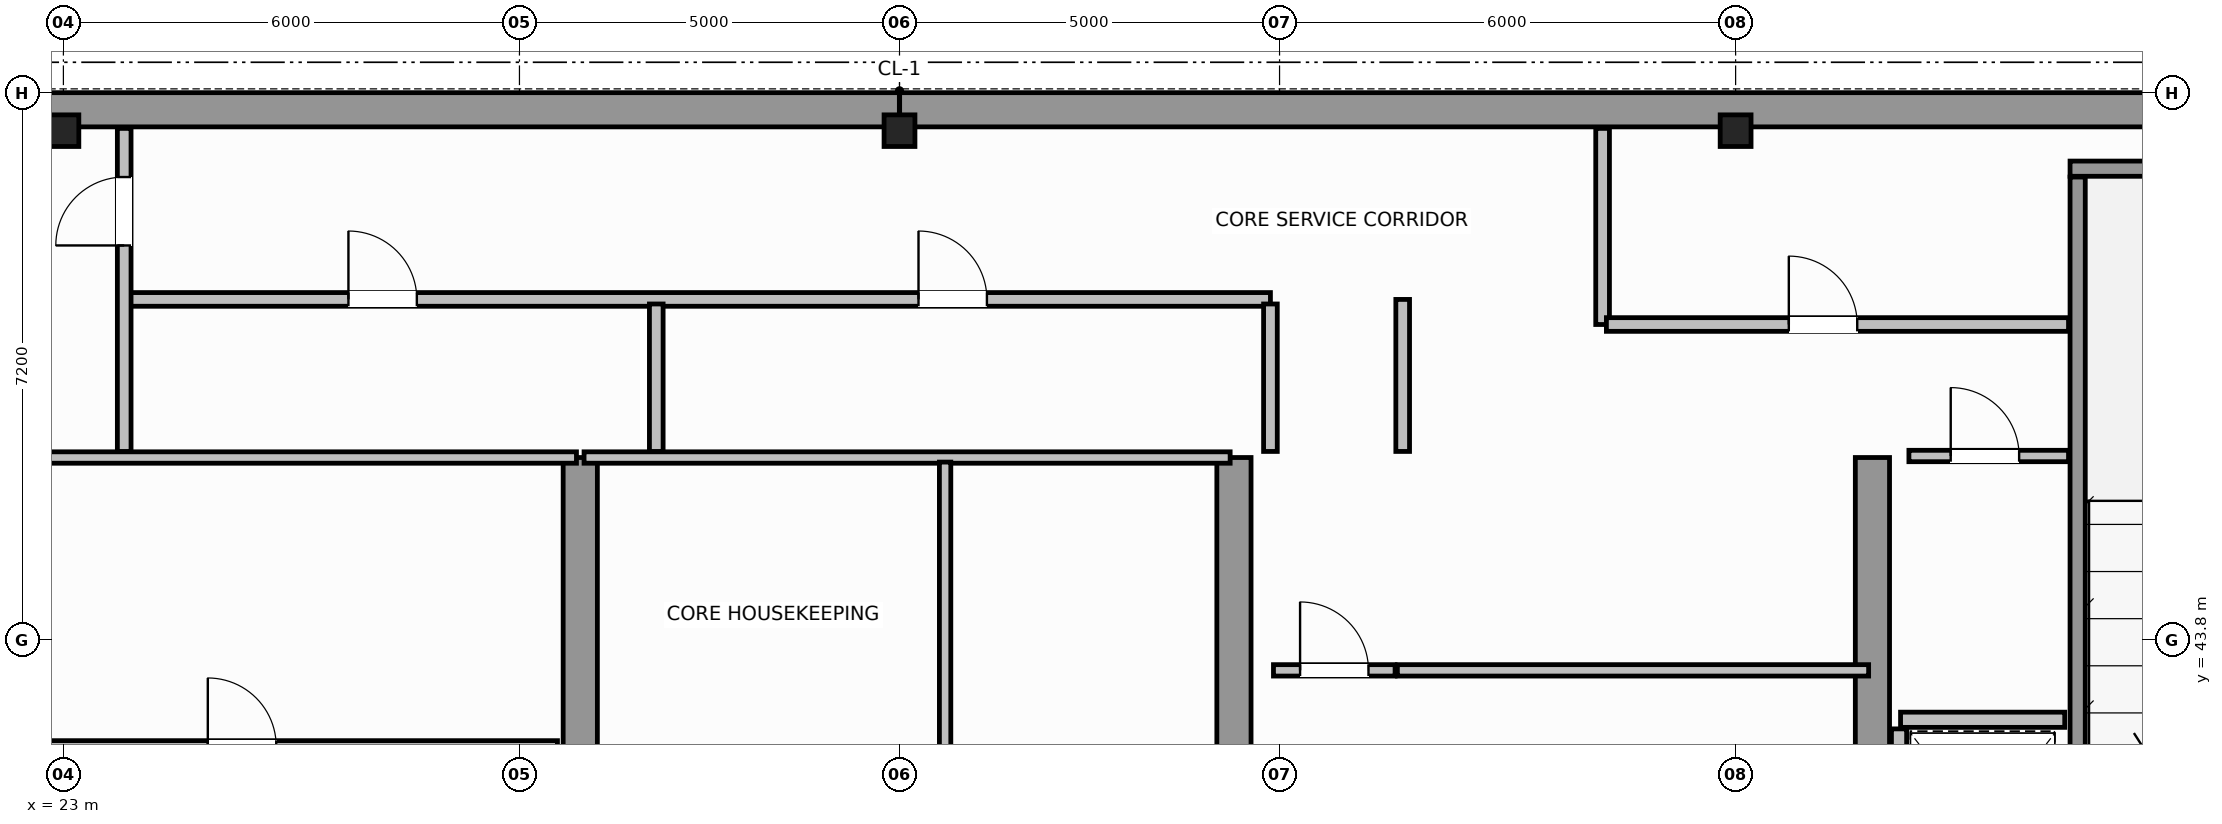
"""IFC4 building model, lengths in metres.
Left out: names, types, materials, properties, quantities, classifications, styles, units other than length and angle.
Written with IfcOpenShell. Run it as: python <this file> out.ifc"""

import sys

from ifc_helpers import new_model, si_unit, direction, frame, frame_2d, origin, origin_2d, place, context, subcontext, project, spatial, rectangle, i_section, extrude, source, transform, mapped, element, fill, save


model = new_model("IFC4")
c1 = context("Model", 3, precision=1e-05, world=origin(), true_north=direction((0.0, 1.0)))
c2 = subcontext(c1, "Body", "Model", "MODEL_VIEW")
j1 = project(units=[si_unit("LENGTHUNIT", "METRE"), si_unit("PLANEANGLEUNIT", "RADIAN")], contexts=[c1])
p1 = place(None, origin())
s1 = spatial("IfcSite", under=j1, at=p1, CompositionType="ELEMENT")
p2 = place(p1, origin())
s2 = spatial("IfcBuilding", under=s1, at=p2, CompositionType="ELEMENT")
p3 = place(p2, frame((0.0, 0.0, 308.4)))
s3 = spatial("IfcBuildingStorey", under=s2, at=p3, CompositionType="ELEMENT", Elevation=308.4)
m1 = source(origin(), c2, "Body", "SweptSolid", [
    extrude(i_section(OverallWidth=0.406, OverallDepth=0.416, WebThickness=0.03, FlangeThickness=0.042, FilletRadius=0.015, at=origin_2d()), origin(), (0.0, 0.0, 1.0), 4.4),
])
for number, where, z_axis, x_axis in (
    (1, (23.0, 50.5, 0.0), (0.0, 0.0, 1.0), (1.0, 0.0, 0.0)),
    (2, (34.0, 50.5, 0.0), (0.0, 0.0, 1.0), (1.0, 0.0, 0.0)),
    (3, (45.0, 50.5, 0.0), (0.0, 0.0, 1.0), (1.0, 0.0, 0.0)),
):
    element("IfcColumn", number, at=place(p3, frame(where, z_axis=z_axis, x_axis=x_axis)), inside=s3, PredefinedType="COLUMN", context=c2, shape_type="MappedRepresentation", body=[
        mapped(m1, transform((0.0, 0.0, 0.0), scale=1.0)),
    ])
for number, where, z_axis, x_axis in (
    (4, (14.229, 50.775, 0.0), (0.0, 0.0, 1.0), (1.0, 0.0, 0.0)),
    (5, (34.002, 50.775, 0.0), (0.0, 0.0, 1.0), (1.0, 0.0, 0.0)),
):
    element("IfcWall", number, at=place(p3, frame(where, z_axis=z_axis, x_axis=x_axis)), inside=s3, PredefinedType="SHEAR", context=c2, shape_type="SweptSolid", body=[
        extrude(rectangle(XDim=19.769, YDim=0.45, at=frame_2d((9.885, 0.0))), origin(), (0.0, 0.0, 1.0), 4.4),
    ])
for number, where, z_axis, x_axis in (
    (6, (29.8, 36.745, 0.0), (0.0, 0.0, 1.0), (0.0, 1.0, 0.0)),
    (7, (38.4, 36.745, 0.0), (0.0, 0.0, 1.0), (0.0, 1.0, 0.0)),
    (8, (46.8, 36.745, 0.0), (0.0, 0.0, 1.0), (0.0, 1.0, 0.0)),
):
    element("IfcWall", number, at=place(p3, frame(where, z_axis=z_axis, x_axis=x_axis)), inside=s3, PredefinedType="SHEAR", context=c2, shape_type="SweptSolid", body=[
        extrude(rectangle(XDim=9.455, YDim=0.45, at=frame_2d((4.728, 0.0))), origin(), (0.0, 0.0, 1.0), 4.4),
    ])
p4 = place(p3, frame((49.4, 50.0, 0.0), z_axis=(0.0, 0.0, 1.0), x_axis=(1.0, 0.0, 0.0)))
e9 = element("IfcWall", 9, at=p4, inside=s3, PredefinedType="SOLIDWALL", context=c2, shape_type="SweptSolid", body=[
    extrude(rectangle(XDim=4.375, YDim=0.2, at=frame_2d((2.188, 0.0))), origin(), (0.0, 0.0, 1.0), 4.4),
])
p5 = place(p3, frame((49.5, 39.96, 0.0), z_axis=(0.0, 0.0, 1.0), x_axis=(0.0, 1.0, 0.0)))
e10 = element("IfcWall", 10, at=p5, inside=s3, PredefinedType="SOLIDWALL", context=c2, shape_type="SweptSolid", body=[
    extrude(rectangle(XDim=9.93, YDim=0.2, at=frame_2d((4.965, 0.0))), origin(), (0.0, 0.0, 1.0), 4.4),
])
p6 = place(p3, frame((47.17, 42.75, 0.0), z_axis=(0.0, 0.0, 1.0), x_axis=(1.0, 0.0, 0.0)))
e11 = element("IfcWall", 11, at=p6, inside=s3, PredefinedType="SOLIDWALL", context=c2, shape_type="SweptSolid", body=[
    extrude(rectangle(XDim=2.16, YDim=0.2, at=frame_2d((1.08, 0.0))), origin(), (0.0, 0.0, 1.0), 4.1),
])
p7 = place(p3, frame((47.15, 40.07, 0.0), z_axis=(0.0, 0.0, 1.0), x_axis=(0.0, 1.0, 0.0)))
e12 = element("IfcWall", 12, at=p7, inside=s3, PredefinedType="SOLIDWALL", context=c2, shape_type="SweptSolid", body=[
    extrude(rectangle(XDim=2.56, YDim=0.2, at=frame_2d((1.28, 0.0))), origin(), (0.0, 0.0, 1.0), 4.1),
])
p8 = place(p3, frame((21.25, 46.2, 0.0), z_axis=(0.0, 0.0, 1.0), x_axis=(1.0, 0.0, 0.0)))
e13 = element("IfcWall", 13, at=p8, inside=s3, PredefinedType="PARTITIONING", context=c2, shape_type="SweptSolid", body=[
    extrude(rectangle(XDim=8.5, YDim=0.15, at=frame_2d((4.25, 0.0))), origin(), (0.0, 0.0, 1.0), 4.1),
])
p9 = place(p3, frame((21.5, 42.4, 0.0), z_axis=(0.0, 0.0, 1.0), x_axis=(1.0, 0.0, 0.0)))
e14 = element("IfcWall", 14, at=p9, inside=s3, PredefinedType="PARTITIONING", context=c2, shape_type="SweptSolid", body=[
    extrude(rectangle(XDim=8.0, YDim=0.15, at=frame_2d((4.0, 0.0))), origin(), (0.0, 0.0, 1.0), 4.1),
])
p10 = place(p9, frame((3.4, 0.0, 0.0)))
e15 = element("IfcOpeningElement", 15, at=p10, cuts=e14, PredefinedType="OPENING", context=c2, shape_type="SweptSolid", body=[
    extrude(rectangle(XDim=0.9, YDim=2.1, at=frame_2d((0.45, 1.05))), frame((0.0, 0.085, 0.0), z_axis=(0.0, -1.0, 0.0), x_axis=(1.0, 0.0, 0.0)), (0.0, 0.0, 1.0), 0.17),
])
p11 = place(p3, frame((29.85, 46.2, 0.0), z_axis=(0.0, 0.0, 1.0), x_axis=(1.0, 0.0, 0.0)))
e16 = element("IfcWall", 16, at=p11, inside=s3, PredefinedType="PARTITIONING", context=c2, shape_type="SweptSolid", body=[
    extrude(rectangle(XDim=8.5, YDim=0.15, at=frame_2d((4.25, 0.0))), origin(), (0.0, 0.0, 1.0), 4.1),
])
p12 = place(p3, frame((34.6, 36.56, 0.0), z_axis=(0.0, 0.0, 1.0), x_axis=(0.0, 1.0, 0.0)))
e17 = element("IfcWall", 17, at=p12, inside=s3, PredefinedType="PARTITIONING", context=c2, shape_type="SweptSolid", body=[
    extrude(rectangle(XDim=9.58, YDim=0.15, at=frame_2d((4.79, 0.0))), origin(), (0.0, 0.0, 1.0), 4.1),
])
p13 = place(p12, frame((4.2, 0.0, 0.0)))
e18 = element("IfcOpeningElement", 18, at=p13, cuts=e17, PredefinedType="OPENING", context=c2, shape_type="SweptSolid", body=[
    extrude(rectangle(XDim=0.9, YDim=2.1, at=frame_2d((0.45, 1.05))), frame((0.0, 0.085, 0.0), z_axis=(0.0, -1.0, 0.0), x_axis=(1.0, 0.0, 0.0)), (0.0, 0.0, 1.0), 0.17),
])
p14 = place(p3, frame((40.55, 43.4, 0.0), z_axis=(0.0, 0.0, 1.0), x_axis=(1.0, 0.0, 0.0)))
e19 = element("IfcWall", 19, at=p14, inside=s3, PredefinedType="PARTITIONING", context=c2, shape_type="SweptSolid", body=[
    extrude(rectangle(XDim=6.2, YDim=0.15, at=frame_2d((3.1, 0.0))), origin(), (0.0, 0.0, 1.0), 4.1),
])
p15 = place(p3, frame((47.28, 46.22, 0.0), z_axis=(0.0, 0.0, 1.0), x_axis=(1.0, 0.0, 0.0)))
e20 = element("IfcWall", 20, at=p15, inside=s3, PredefinedType="PARTITIONING", context=c2, shape_type="SweptSolid", body=[
    extrude(rectangle(XDim=2.1, YDim=0.15, at=frame_2d((1.05, 0.0))), origin(), (0.0, 0.0, 1.0), 4.1),
])
p16 = place(p15, frame((0.55, 0.0, 0.0)))
e21 = element("IfcOpeningElement", 21, at=p16, cuts=e20, PredefinedType="OPENING", context=c2, shape_type="SweptSolid", body=[
    extrude(rectangle(XDim=0.9, YDim=2.1, at=frame_2d((0.45, 1.05))), frame((0.0, 0.085, 0.0), z_axis=(0.0, -1.0, 0.0), x_axis=(1.0, 0.0, 0.0)), (0.0, 0.0, 1.0), 0.17),
])
p17 = place(p3, frame((38.92, 43.4, 0.0), z_axis=(0.0, 0.0, 1.0), x_axis=(1.0, 0.0, 0.0)))
e22 = element("IfcWall", 22, at=p17, inside=s3, PredefinedType="PARTITIONING", context=c2, shape_type="SweptSolid", body=[
    extrude(rectangle(XDim=1.6, YDim=0.15, at=frame_2d((0.8, 0.0))), origin(), (0.0, 0.0, 1.0), 4.1),
])
p18 = place(p17, frame((0.35, 0.0, 0.0)))
e23 = element("IfcOpeningElement", 23, at=p18, cuts=e22, PredefinedType="OPENING", context=c2, shape_type="SweptSolid", body=[
    extrude(rectangle(XDim=0.9, YDim=2.1, at=frame_2d((0.45, 1.05))), frame((0.0, 0.085, 0.0), z_axis=(0.0, -1.0, 0.0), x_axis=(1.0, 0.0, 0.0)), (0.0, 0.0, 1.0), 0.17),
])
p19 = place(p3, frame((23.85, 48.28, 0.0), z_axis=(0.0, 0.0, 1.0), x_axis=(1.0, 0.0, 0.0)))
e24 = element("IfcWall", 24, at=p19, inside=s3, PredefinedType="PLUMBINGWALL", context=c2, shape_type="SweptSolid", body=[
    extrude(rectangle(XDim=15.03, YDim=0.18, at=frame_2d((7.515, 0.0))), origin(), (0.0, 0.0, 1.0), 4.1),
])
p20 = place(p19, frame((2.9, 0.0, 0.0)))
e25 = element("IfcOpeningElement", 25, at=p20, cuts=e24, PredefinedType="OPENING", context=c2, shape_type="SweptSolid", body=[
    extrude(rectangle(XDim=0.9, YDim=2.15, at=frame_2d((0.45, 1.075))), frame((0.0, 0.1, 0.0), z_axis=(0.0, -1.0, 0.0), x_axis=(1.0, 0.0, 0.0)), (0.0, 0.0, 1.0), 0.2),
])
p21 = place(p19, frame((10.4, 0.0, 0.0)))
e26 = element("IfcOpeningElement", 26, at=p21, cuts=e24, PredefinedType="OPENING", context=c2, shape_type="SweptSolid", body=[
    extrude(rectangle(XDim=0.9, YDim=2.15, at=frame_2d((0.45, 1.075))), frame((0.0, 0.1, 0.0), z_axis=(0.0, -1.0, 0.0), x_axis=(1.0, 0.0, 0.0)), (0.0, 0.0, 1.0), 0.2),
])
p22 = place(p3, frame((23.8, 46.28, 0.0), z_axis=(0.0, 0.0, 1.0), x_axis=(0.0, 1.0, 0.0)))
e27 = element("IfcWall", 27, at=p22, inside=s3, PredefinedType="PLUMBINGWALL", context=c2, shape_type="SweptSolid", body=[
    extrude(rectangle(XDim=4.25, YDim=0.18, at=frame_2d((2.125, 0.0))), origin(), (0.0, 0.0, 1.0), 4.1),
])
p23 = place(p22, frame((2.71, 0.0, 0.0)))
e28 = element("IfcOpeningElement", 28, at=p23, cuts=e27, PredefinedType="OPENING", context=c2, shape_type="SweptSolid", body=[
    extrude(rectangle(XDim=0.9, YDim=2.15, at=frame_2d((0.45, 1.075))), frame((0.0, 0.1, 0.0), z_axis=(0.0, -1.0, 0.0), x_axis=(1.0, 0.0, 0.0)), (0.0, 0.0, 1.0), 0.2),
])
for number, where, z_axis, x_axis in (
    (29, (30.8, 46.28, 0.0), (0.0, 0.0, 1.0), (0.0, 1.0, 0.0)),
    (30, (38.88, 46.28, 0.0), (0.0, 0.0, 1.0), (0.0, 1.0, 0.0)),
):
    element("IfcWall", number, at=place(p3, frame(where, z_axis=z_axis, x_axis=x_axis)), inside=s3, PredefinedType="PLUMBINGWALL", context=c2, shape_type="SweptSolid", body=[
        extrude(rectangle(XDim=1.94, YDim=0.18, at=frame_2d((0.97, 0.0))), origin(), (0.0, 0.0, 1.0), 4.1),
    ])
p24 = place(p3, frame((40.62, 46.28, 0.0), z_axis=(0.0, 0.0, 1.0), x_axis=(0.0, 1.0, 0.0)))
e31 = element("IfcWall", 31, at=p24, inside=s3, PredefinedType="PLUMBINGWALL", context=c2, shape_type="SweptSolid", body=[
    extrude(rectangle(XDim=2.0, YDim=0.18, at=frame_2d((1.0, 0.0))), origin(), (0.0, 0.0, 1.0), 4.1),
])
p25 = place(p3, frame((43.25, 47.95, 0.0), z_axis=(0.0, 0.0, 1.0), x_axis=(0.0, 1.0, 0.0)))
e32 = element("IfcWall", 32, at=p25, inside=s3, PredefinedType="PLUMBINGWALL", context=c2, shape_type="SweptSolid", body=[
    extrude(rectangle(XDim=2.58, YDim=0.18, at=frame_2d((1.29, 0.0))), origin(), (0.0, 0.0, 1.0), 4.1),
])
p26 = place(p3, frame((43.3, 47.95, 0.0), z_axis=(0.0, 0.0, 1.0), x_axis=(1.0, 0.0, 0.0)))
e33 = element("IfcWall", 33, at=p26, inside=s3, PredefinedType="PLUMBINGWALL", context=c2, shape_type="SweptSolid", body=[
    extrude(rectangle(XDim=6.08, YDim=0.18, at=frame_2d((3.04, 0.0))), origin(), (0.0, 0.0, 1.0), 4.1),
])
p27 = place(p26, frame((2.4, 0.0, 0.0)))
e34 = element("IfcOpeningElement", 34, at=p27, cuts=e33, PredefinedType="OPENING", context=c2, shape_type="SweptSolid", body=[
    extrude(rectangle(XDim=0.9, YDim=2.15, at=frame_2d((0.45, 1.075))), frame((0.0, 0.1, 0.0), z_axis=(0.0, -1.0, 0.0), x_axis=(1.0, 0.0, 0.0)), (0.0, 0.0, 1.0), 0.2),
])
m2 = source(origin(), c2, "Body", "SweptSolid", [
    extrude(rectangle(XDim=0.9, YDim=2.1, at=frame_2d((0.45, 1.05))), frame((0.0, 0.025, 0.0), z_axis=(0.0, -1.0, 0.0), x_axis=(1.0, 0.0, 0.0)), (0.0, 0.0, 1.0), 0.05),
])
p28 = place(p10, origin())
e35 = element("IfcDoor", 35, at=p28, inside=s3, OperationType="SINGLE_SWING_RIGHT", PredefinedType="DOOR", context=c2, shape_type="MappedRepresentation", body=[
    mapped(m2, transform((0.0, 0.0, 0.0), scale=1.0)),
])
fill(e15, e35)
p29 = place(p16, origin())
e36 = element("IfcDoor", 36, at=p29, inside=s3, OperationType="SINGLE_SWING_RIGHT", PredefinedType="DOOR", context=c2, shape_type="MappedRepresentation", body=[
    mapped(m2, transform((0.0, 0.0, 0.0), scale=1.0)),
])
fill(e21, e36)
p30 = place(p18, origin())
e37 = element("IfcDoor", 37, at=p30, inside=s3, OperationType="SINGLE_SWING_LEFT", PredefinedType="DOOR", context=c2, shape_type="MappedRepresentation", body=[
    mapped(m2, transform((0.0, 0.0, 0.0), scale=1.0)),
])
fill(e23, e37)
m3 = source(origin(), c2, "Body", "SweptSolid", [
    extrude(rectangle(XDim=0.9, YDim=2.15, at=frame_2d((0.45, 1.075))), frame((0.0, 0.025, 0.0), z_axis=(0.0, -1.0, 0.0), x_axis=(1.0, 0.0, 0.0)), (0.0, 0.0, 1.0), 0.05),
])
p31 = place(p23, origin())
e38 = element("IfcDoor", 38, at=p31, inside=s3, OperationType="SINGLE_SWING_LEFT", PredefinedType="DOOR", context=c2, shape_type="MappedRepresentation", body=[
    mapped(m3, transform((0.0, 0.0, 0.0), scale=1.0)),
])
fill(e28, e38)
p32 = place(p20, origin())
e39 = element("IfcDoor", 39, at=p32, inside=s3, OperationType="SINGLE_SWING_RIGHT", PredefinedType="DOOR", context=c2, shape_type="MappedRepresentation", body=[
    mapped(m3, transform((0.0, 0.0, 0.0), scale=1.0)),
])
fill(e25, e39)
p33 = place(p21, origin())
e40 = element("IfcDoor", 40, at=p33, inside=s3, OperationType="SINGLE_SWING_LEFT", PredefinedType="DOOR", context=c2, shape_type="MappedRepresentation", body=[
    mapped(m3, transform((0.0, 0.0, 0.0), scale=1.0)),
])
fill(e26, e40)
p34 = place(p27, origin())
e41 = element("IfcDoor", 41, at=p34, inside=s3, OperationType="SINGLE_SWING_RIGHT", PredefinedType="DOOR", context=c2, shape_type="MappedRepresentation", body=[
    mapped(m3, transform((0.0, 0.0, 0.0), scale=1.0)),
])
fill(e34, e41)
save(model, sys.argv[1])
